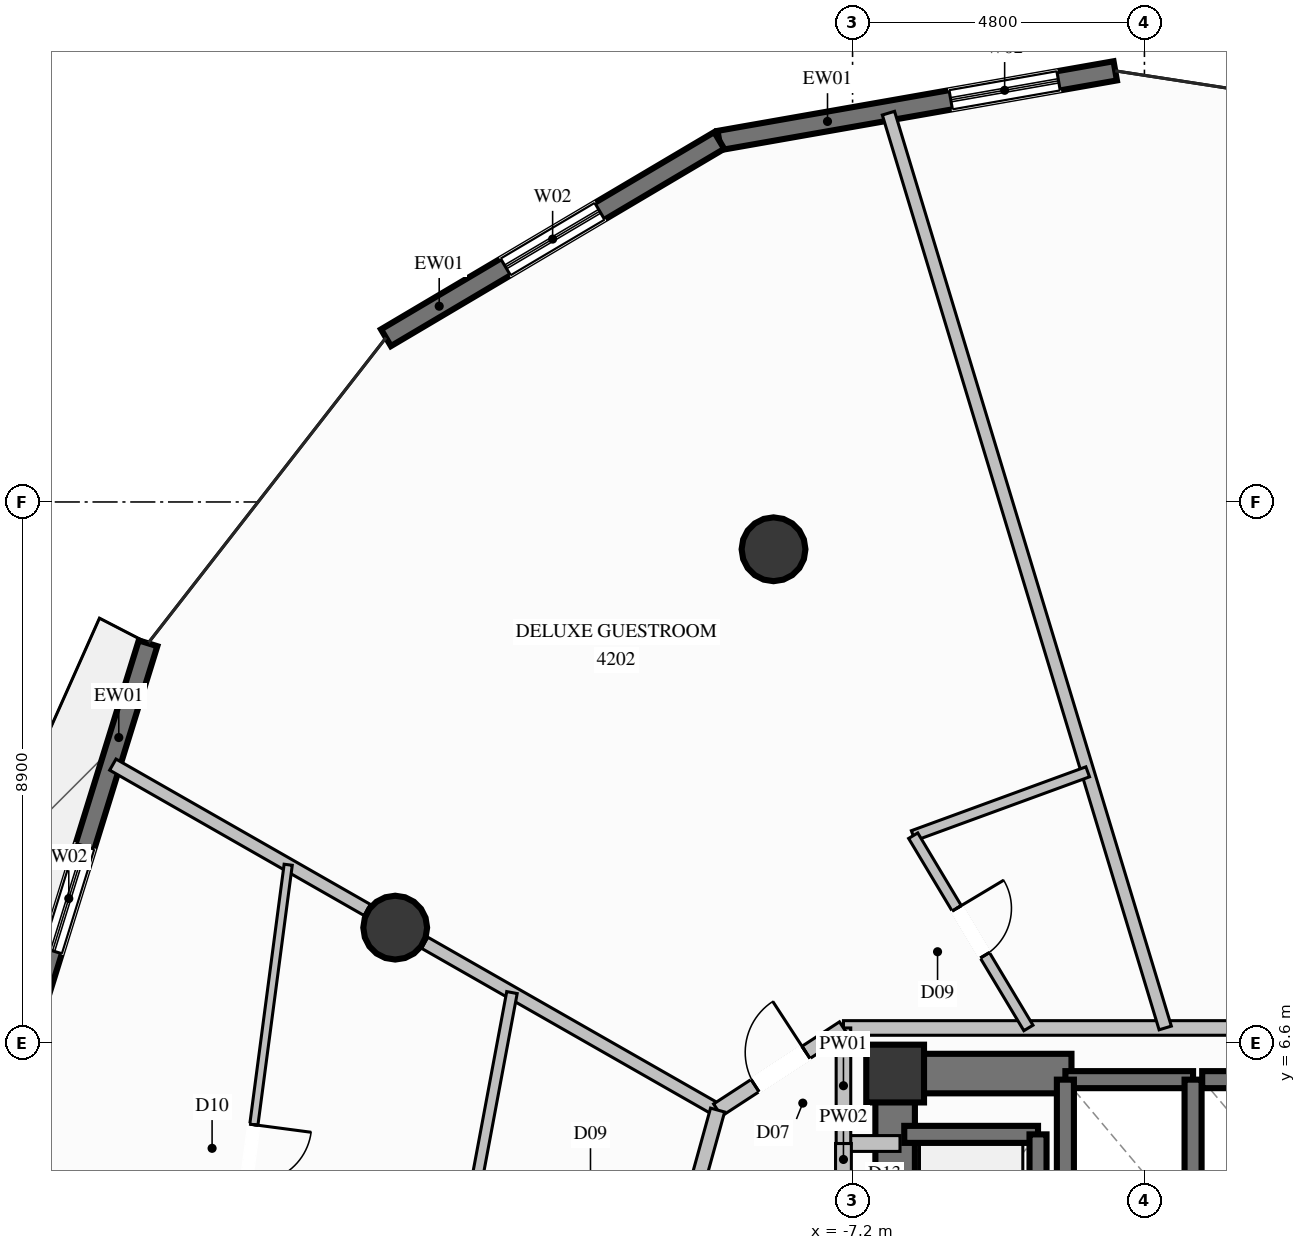
"""IFC4 building model, lengths in metres.
Left out: names, types, materials, properties, quantities, classifications, styles, units other than length and angle.
Written with IfcOpenShell. Run it as: python <this file> out.ifc"""

import sys

from ifc_helpers import new_model, si_unit, direction, frame, frame_2d, origin, origin_2d, place, context, subcontext, project, spatial, rectangle, circle, extrude, element, fill, save


model = new_model("IFC4")
c1 = context("Model", 3, precision=1e-05, world=origin(), true_north=direction((0.0, 1.0)))
c2 = subcontext(c1, "Body", "Model", "MODEL_VIEW")
j1 = project(units=[si_unit("LENGTHUNIT", "METRE"), si_unit("PLANEANGLEUNIT", "RADIAN")], contexts=[c1])
p1 = place(None, origin())
s1 = spatial("IfcSite", under=j1, at=p1, CompositionType="ELEMENT")
p2 = place(p1, origin())
s2 = spatial("IfcBuilding", under=s1, at=p2, CompositionType="ELEMENT")
p3 = place(p2, frame((0.0, 0.0, 156.6)))
s3 = spatial("IfcBuildingStorey", under=s2, at=p3, CompositionType="ELEMENT", Elevation=156.6)
p4 = place(p3, frame((-6.5, 6.1, 0.0), z_axis=(0.0, 0.0, 1.0), x_axis=(1.0, 0.0, 0.0)))
e1 = element("IfcColumn", 1, at=p4, inside=s3, PredefinedType="COLUMN", context=c2, shape_type="SweptSolid", body=[
    extrude(rectangle(XDim=0.95, YDim=0.95, at=origin_2d()), origin(), (0.0, 0.0, 1.0), 3.6),
])
p5 = place(p3, frame((-6.175, 6.1, 0.0), z_axis=(0.0, 0.0, 1.0), x_axis=(1.0, 0.0, 0.0)))
e2 = element("IfcWall", 2, at=p5, inside=s3, PredefinedType="SHEAR", context=c2, shape_type="SweptSolid", body=[
    extrude(rectangle(XDim=2.575, YDim=0.65, at=frame_2d((1.288, 0.0))), origin(), (0.0, 0.0, 1.0), 3.6),
])
p6 = place(p3, frame((-6.5, 2.35, 0.0), z_axis=(0.0, 0.0, 1.0), x_axis=(0.0, 1.0, 0.0)))
e3 = element("IfcWall", 3, at=p6, inside=s3, PredefinedType="SHEAR", context=c2, shape_type="SweptSolid", body=[
    extrude(rectangle(XDim=4.075, YDim=0.65, at=frame_2d((2.038, 0.0))), origin(), (0.0, 0.0, 1.0), 3.6),
])
for number, where, z_axis, x_axis in (
    (4, (-8.5, 14.722, 0.0), (0.0, 0.0, 1.0), (1.0, 0.0, 0.0)),
    (5, (-14.722, 8.5, 0.0), (0.0, 0.0, 1.0), (1.0, 0.0, 0.0)),
):
    element("IfcColumn", number, at=place(p3, frame(where, z_axis=z_axis, x_axis=x_axis)), inside=s3, PredefinedType="COLUMN", context=c2, shape_type="SweptSolid", body=[
        extrude(circle(Radius=0.525, at=origin_2d()), origin(), (0.0, 0.0, 1.0), 3.6),
    ])
p7 = place(p3, frame((-9.393, 21.445, 0.0), z_axis=(0.0, 0.0, 1.0), x_axis=(0.984896334406, 0.173145056165, 0.0)))
e6 = element("IfcWall", 6, at=p7, inside=s3, PredefinedType="SOLIDWALL", context=c2, shape_type="SweptSolid", body=[
    extrude(rectangle(XDim=6.613, YDim=0.32, at=frame_2d((3.307, 0.0))), origin(), (0.0, 0.0, 1.0), 3.35),
])
p8 = place(p7, frame((3.866, 0.0, 0.35)))
e7 = element("IfcOpeningElement", 7, at=p8, cuts=e6, PredefinedType="OPENING", context=c2, shape_type="SweptSolid", body=[
    extrude(rectangle(XDim=1.8, YDim=2.6, at=frame_2d((0.9, 1.3))), frame((0.0, 0.17, 0.0), z_axis=(0.0, -1.0, 0.0), x_axis=(1.0, 0.0, 0.0)), (0.0, 0.0, 1.0), 0.34),
])
p9 = place(p3, frame((-14.874, 18.201, 0.0), z_axis=(0.0, 0.0, 1.0), x_axis=(0.860555423253, 0.50935681355, 0.0)))
e8 = element("IfcWall", 8, at=p9, inside=s3, PredefinedType="SOLIDWALL", context=c2, shape_type="SweptSolid", body=[
    extrude(rectangle(XDim=6.369, YDim=0.32, at=frame_2d((3.185, 0.0))), origin(), (0.0, 0.0, 1.0), 3.35),
])
p10 = place(p9, frame((2.285, 0.0, 0.35)))
e9 = element("IfcOpeningElement", 9, at=p10, cuts=e8, PredefinedType="OPENING", context=c2, shape_type="SweptSolid", body=[
    extrude(rectangle(XDim=1.8, YDim=2.6, at=frame_2d((0.9, 1.3))), frame((0.0, 0.17, 0.0), z_axis=(0.0, -1.0, 0.0), x_axis=(1.0, 0.0, 0.0)), (0.0, 0.0, 1.0), 0.34),
])
p11 = place(p3, frame((-20.748, 6.86, 0.0), z_axis=(0.0, 0.0, 1.0), x_axis=(0.296513005153, 0.955028815154, 0.0)))
e10 = element("IfcWall", 10, at=p11, inside=s3, PredefinedType="SOLIDWALL", context=c2, shape_type="SweptSolid", body=[
    extrude(rectangle(XDim=6.613, YDim=0.32, at=frame_2d((3.307, 0.0))), origin(), (0.0, 0.0, 1.0), 3.35),
])
p12 = place(p11, frame((1.318, 0.0, 0.35)))
e11 = element("IfcOpeningElement", 11, at=p12, cuts=e10, PredefinedType="OPENING", context=c2, shape_type="SweptSolid", body=[
    extrude(rectangle(XDim=1.8, YDim=2.6, at=frame_2d((0.9, 1.3))), frame((0.0, 0.17, 0.0), z_axis=(0.0, -1.0, 0.0), x_axis=(1.0, 0.0, 0.0)), (0.0, 0.0, 1.0), 0.34),
])
p13 = place(p3, frame((-1.6, 6.0, 0.0), z_axis=(0.0, 0.0, 1.0), x_axis=(-1.0, 0.0, 0.0)))
e12 = element("IfcWall", 12, at=p13, inside=s3, PredefinedType="SOLIDWALL", context=c2, shape_type="SweptSolid", body=[
    extrude(rectangle(XDim=2.1, YDim=0.28, at=frame_2d((1.05, 0.0))), origin(), (0.0, 0.0, 1.0), 3.35),
])
for number, where, z_axis, x_axis in (
    (13, (-3.7, 6.0, 0.0), (0.0, 0.0, 1.0), (0.0, -1.0, 0.0)),
    (14, (-1.6, 3.5, 0.0), (0.0, 0.0, 1.0), (0.0, 1.0, 0.0)),
):
    element("IfcWall", number, at=place(p3, frame(where, z_axis=z_axis, x_axis=x_axis)), inside=s3, PredefinedType="SOLIDWALL", context=c2, shape_type="SweptSolid", body=[
        extrude(rectangle(XDim=2.5, YDim=0.28, at=frame_2d((1.25, 0.0))), origin(), (0.0, 0.0, 1.0), 3.35),
    ])
p14 = place(p3, frame((0.65, 6.0, 0.0), z_axis=(0.0, 0.0, 1.0), x_axis=(-1.0, 0.0, 0.0)))
e15 = element("IfcWall", 15, at=p14, inside=s3, PredefinedType="SOLIDWALL", context=c2, shape_type="SweptSolid", body=[
    extrude(rectangle(XDim=2.1, YDim=0.28, at=frame_2d((1.05, 0.0))), origin(), (0.0, 0.0, 1.0), 3.35),
])
p15 = place(p3, frame((-4.15, 5.1, 0.0), z_axis=(0.0, 0.0, 1.0), x_axis=(-1.0, 0.0, 0.0)))
e16 = element("IfcWall", 16, at=p15, inside=s3, PredefinedType="SOLIDWALL", context=c2, shape_type="SweptSolid", body=[
    extrude(rectangle(XDim=2.2, YDim=0.28, at=frame_2d((1.1, 0.0))), origin(), (0.0, 0.0, 1.0), 3.35),
])
p16 = place(p3, frame((-4.15, 2.4, 0.0), z_axis=(0.0, 0.0, 1.0), x_axis=(0.0, 1.0, 0.0)))
e17 = element("IfcWall", 17, at=p16, inside=s3, PredefinedType="SOLIDWALL", context=c2, shape_type="SweptSolid", body=[
    extrude(rectangle(XDim=2.7, YDim=0.28, at=frame_2d((1.35, 0.0))), origin(), (0.0, 0.0, 1.0), 3.35),
])
p17 = place(p3, frame((-7.35, 4.95, 0.0), z_axis=(0.0, 0.0, 1.0), x_axis=(1.0, 0.0, 0.0)))
e18 = element("IfcWall", 18, at=p17, inside=s3, PredefinedType="PARTITIONING", context=c2, shape_type="SweptSolid", body=[
    extrude(rectangle(XDim=0.93, YDim=0.26, at=frame_2d((0.465, 0.0))), origin(), (0.0, 0.0, 1.0), 3.35),
])
p18 = place(p3, frame((-7.35, 2.55, 0.0), z_axis=(0.0, 0.0, 1.0), x_axis=(0.0, 1.0, 0.0)))
e19 = element("IfcWall", 19, at=p18, inside=s3, PredefinedType="PARTITIONING", context=c2, shape_type="SweptSolid", body=[
    extrude(rectangle(XDim=2.4, YDim=0.26, at=frame_2d((1.2, 0.0))), origin(), (0.0, 0.0, 1.0), 2.435),
])
p19 = place(p18, frame((0.775, 0.0, 0.0)))
e20 = element("IfcOpeningElement", 20, at=p19, cuts=e19, PredefinedType="OPENING", context=c2, shape_type="SweptSolid", body=[
    extrude(rectangle(XDim=0.85, YDim=2.05, at=frame_2d((0.425, 1.025))), frame((0.0, 0.14, 0.0), z_axis=(0.0, -1.0, 0.0), x_axis=(1.0, 0.0, 0.0)), (0.0, 0.0, 1.0), 0.28),
])
p20 = place(p3, frame((-7.35, 6.85, 0.0), z_axis=(0.0, 0.0, 1.0), x_axis=(1.0, 0.0, 0.0)))
e21 = element("IfcWall", 21, at=p20, inside=s3, PredefinedType="PARTITIONING", context=c2, shape_type="SweptSolid", body=[
    extrude(rectangle(XDim=14.7, YDim=0.24, at=frame_2d((7.35, 0.0))), origin(), (0.0, 0.0, 1.0), 2.435),
])
p21 = place(p3, frame((-7.35, 4.95, 0.0), z_axis=(0.0, 0.0, 1.0), x_axis=(0.0, 1.0, 0.0)))
e22 = element("IfcWall", 22, at=p21, inside=s3, PredefinedType="PARTITIONING", context=c2, shape_type="SweptSolid", body=[
    extrude(rectangle(XDim=1.9, YDim=0.24, at=frame_2d((0.95, 0.0))), origin(), (0.0, 0.0, 1.0), 2.435),
])
p22 = place(p3, frame((-9.42, 5.5, 0.0), z_axis=(0.0, 0.0, 1.0), x_axis=(-0.868373112855, 0.495911420387, 0.0)))
e23 = element("IfcWall", 23, at=p22, inside=s3, PredefinedType="PARTITIONING", context=c2, shape_type="SweptSolid", body=[
    extrude(rectangle(XDim=5.547, YDim=0.21, at=frame_2d((2.774, 0.0))), origin(), (0.0, 0.0, 1.0), 2.717),
])
p23 = place(p3, frame((-15.183, 8.791, 0.0), z_axis=(0.0, 0.0, 1.0), x_axis=(-0.868271208713, 0.496089818601, 0.0)))
e24 = element("IfcWall", 24, at=p23, inside=s3, PredefinedType="PARTITIONING", context=c2, shape_type="SweptSolid", body=[
    extrude(rectangle(XDim=4.817, YDim=0.21, at=frame_2d((2.409, 0.0))), origin(), (0.0, 0.0, 1.0), 3.35),
])
p24 = place(p3, frame((-2.058, 6.85, 0.0), z_axis=(0.0, 0.0, 1.0), x_axis=(-0.289612905442, 0.957143858049, 0.0)))
e25 = element("IfcWall", 25, at=p24, inside=s3, PredefinedType="PARTITIONING", context=c2, shape_type="SweptSolid", body=[
    extrude(rectangle(XDim=15.718, YDim=0.21, at=frame_2d((7.859, 0.0))), origin(), (0.0, 0.0, 1.0), 3.35),
])
p25 = place(p3, frame((-6.203, 10.012, 0.0), z_axis=(0.0, 0.0, 1.0), x_axis=(0.939112792054, 0.343609027531, 0.0)))
e26 = element("IfcWall", 26, at=p25, inside=s3, PredefinedType="PLUMBINGWALL", context=c2, shape_type="SweptSolid", body=[
    extrude(rectangle(XDim=3.056, YDim=0.175, at=frame_2d((1.528, 0.0))), origin(), (0.0, 0.0, 1.0), 3.35),
])
p26 = place(p3, frame((-6.203, 10.012, 0.0), z_axis=(0.0, 0.0, 1.0), x_axis=(0.514028157497, -0.857773311138, 0.0)))
e27 = element("IfcWall", 27, at=p26, inside=s3, PredefinedType="PLUMBINGWALL", context=c2, shape_type="SweptSolid", body=[
    extrude(rectangle(XDim=3.686, YDim=0.175, at=frame_2d((1.843, 0.0))), origin(), (0.0, 0.0, 1.0), 3.35),
])
p27 = place(p26, frame((1.393, 0.0, 0.0)))
e28 = element("IfcOpeningElement", 28, at=p27, cuts=e27, PredefinedType="OPENING", context=c2, shape_type="SweptSolid", body=[
    extrude(rectangle(XDim=0.9, YDim=2.1, at=frame_2d((0.45, 1.05))), frame((0.0, 0.098, 0.0), z_axis=(0.0, -1.0, 0.0), x_axis=(1.0, 0.0, 0.0)), (0.0, 0.0, 1.0), 0.195),
])
p28 = place(p3, frame((-9.42, 5.5, 0.0), z_axis=(0.0, 0.0, 1.0), x_axis=(0.837571286912, 0.546328051029, 0.0)))
e29 = element("IfcWall", 29, at=p28, inside=s3, PredefinedType="PARTITIONING", context=c2, shape_type="SweptSolid", body=[
    extrude(rectangle(XDim=2.471, YDim=0.24, at=frame_2d((1.236, 0.0))), origin(), (0.0, 0.0, 1.0), 3.35),
])
p29 = place(p28, frame((0.736, 0.0, 0.0)))
e30 = element("IfcOpeningElement", 30, at=p29, cuts=e29, PredefinedType="OPENING", context=c2, shape_type="SweptSolid", body=[
    extrude(rectangle(XDim=1.0, YDim=2.2, at=frame_2d((0.5, 1.1))), frame((0.0, 0.13, 0.0), z_axis=(0.0, -1.0, 0.0), x_axis=(1.0, 0.0, 0.0)), (0.0, 0.0, 1.0), 0.26),
])
p30 = place(p3, frame((-9.42, 5.5, 0.0), z_axis=(0.0, 0.0, 1.0), x_axis=(-0.266801280383, -0.963751563831, 0.0)))
e31 = element("IfcWall", 31, at=p30, inside=s3, PredefinedType="PARTITIONING", context=c2, shape_type="SweptSolid", body=[
    extrude(rectangle(XDim=2.332, YDim=0.24, at=frame_2d((1.166, 0.0))), origin(), (0.0, 0.0, 1.0), 3.35),
])
p31 = place(p3, frame((-12.802, 7.432, 0.0), z_axis=(0.0, 0.0, 1.0), x_axis=(-0.183813348356, -0.982961165543, 0.0)))
e32 = element("IfcWall", 32, at=p31, inside=s3, PredefinedType="PLUMBINGWALL", context=c2, shape_type="SweptSolid", body=[
    extrude(rectangle(XDim=3.133, YDim=0.175, at=frame_2d((1.567, 0.0))), origin(), (0.0, 0.0, 1.0), 3.35),
])
p32 = place(p3, frame((-16.482, 9.534, 0.0), z_axis=(0.0, 0.0, 1.0), x_axis=(-0.131002685595, -0.991382013336, 0.0)))
e33 = element("IfcWall", 33, at=p32, inside=s3, PredefinedType="PARTITIONING", context=c2, shape_type="SweptSolid", body=[
    extrude(rectangle(XDim=9.573, YDim=0.135, at=frame_2d((4.787, 0.0))), origin(), (0.0, 0.0, 1.0), 3.35),
])
p33 = place(p32, frame((4.312, 0.0, 0.0)))
e34 = element("IfcOpeningElement", 34, at=p33, cuts=e33, PredefinedType="OPENING", context=c2, shape_type="SweptSolid", body=[
    extrude(rectangle(XDim=0.95, YDim=2.1, at=frame_2d((0.475, 1.05))), frame((0.0, 0.078, 0.0), z_axis=(0.0, -1.0, 0.0), x_axis=(1.0, 0.0, 0.0)), (0.0, 0.0, 1.0), 0.155),
])
p34 = place(p8, origin())
e35 = element("IfcWindow", 35, at=p34, inside=s3, PartitioningType="SINGLE_PANEL", PredefinedType="WINDOW", context=c2, shape_type="SweptSolid", body=[
    extrude(rectangle(XDim=1.8, YDim=2.6, at=frame_2d((0.9, 1.3))), frame((0.0, 0.03, 0.0), z_axis=(0.0, -1.0, 0.0), x_axis=(1.0, 0.0, 0.0)), (0.0, 0.0, 1.0), 0.06),
])
fill(e7, e35)
p35 = place(p10, origin())
e36 = element("IfcWindow", 36, at=p35, inside=s3, PartitioningType="SINGLE_PANEL", PredefinedType="WINDOW", context=c2, shape_type="SweptSolid", body=[
    extrude(rectangle(XDim=1.8, YDim=2.6, at=frame_2d((0.9, 1.3))), frame((0.0, 0.03, 0.0), z_axis=(0.0, -1.0, 0.0), x_axis=(1.0, 0.0, 0.0)), (0.0, 0.0, 1.0), 0.06),
])
fill(e9, e36)
p36 = place(p12, origin())
e37 = element("IfcWindow", 37, at=p36, inside=s3, PartitioningType="SINGLE_PANEL", PredefinedType="WINDOW", context=c2, shape_type="SweptSolid", body=[
    extrude(rectangle(XDim=1.8, YDim=2.6, at=frame_2d((0.9, 1.3))), frame((0.0, 0.03, 0.0), z_axis=(0.0, -1.0, 0.0), x_axis=(1.0, 0.0, 0.0)), (0.0, 0.0, 1.0), 0.06),
])
fill(e11, e37)
p37 = place(p27, origin())
e38 = element("IfcDoor", 38, at=p37, inside=s3, OperationType="SINGLE_SWING_LEFT", PredefinedType="DOOR", context=c2, shape_type="SweptSolid", body=[
    extrude(rectangle(XDim=0.9, YDim=2.1, at=frame_2d((0.45, 1.05))), frame((0.0, 0.025, 0.0), z_axis=(0.0, -1.0, 0.0), x_axis=(1.0, 0.0, 0.0)), (0.0, 0.0, 1.0), 0.05),
])
fill(e28, e38)
p38 = place(p29, origin())
e39 = element("IfcDoor", 39, at=p38, inside=s3, OperationType="SINGLE_SWING_RIGHT", PredefinedType="DOOR", context=c2, shape_type="SweptSolid", body=[
    extrude(rectangle(XDim=1.0, YDim=2.2, at=frame_2d((0.5, 1.1))), frame((0.0, 0.025, 0.0), z_axis=(0.0, -1.0, 0.0), x_axis=(1.0, 0.0, 0.0)), (0.0, 0.0, 1.0), 0.05),
])
fill(e30, e39)
p39 = place(p33, origin())
e40 = element("IfcDoor", 40, at=p39, inside=s3, OperationType="SINGLE_SWING_LEFT", PredefinedType="DOOR", context=c2, shape_type="SweptSolid", body=[
    extrude(rectangle(XDim=0.95, YDim=2.1, at=frame_2d((0.475, 1.05))), frame((0.0, 0.025, 0.0), z_axis=(0.0, -1.0, 0.0), x_axis=(1.0, 0.0, 0.0)), (0.0, 0.0, 1.0), 0.05),
])
fill(e34, e40)
save(model, sys.argv[1])
